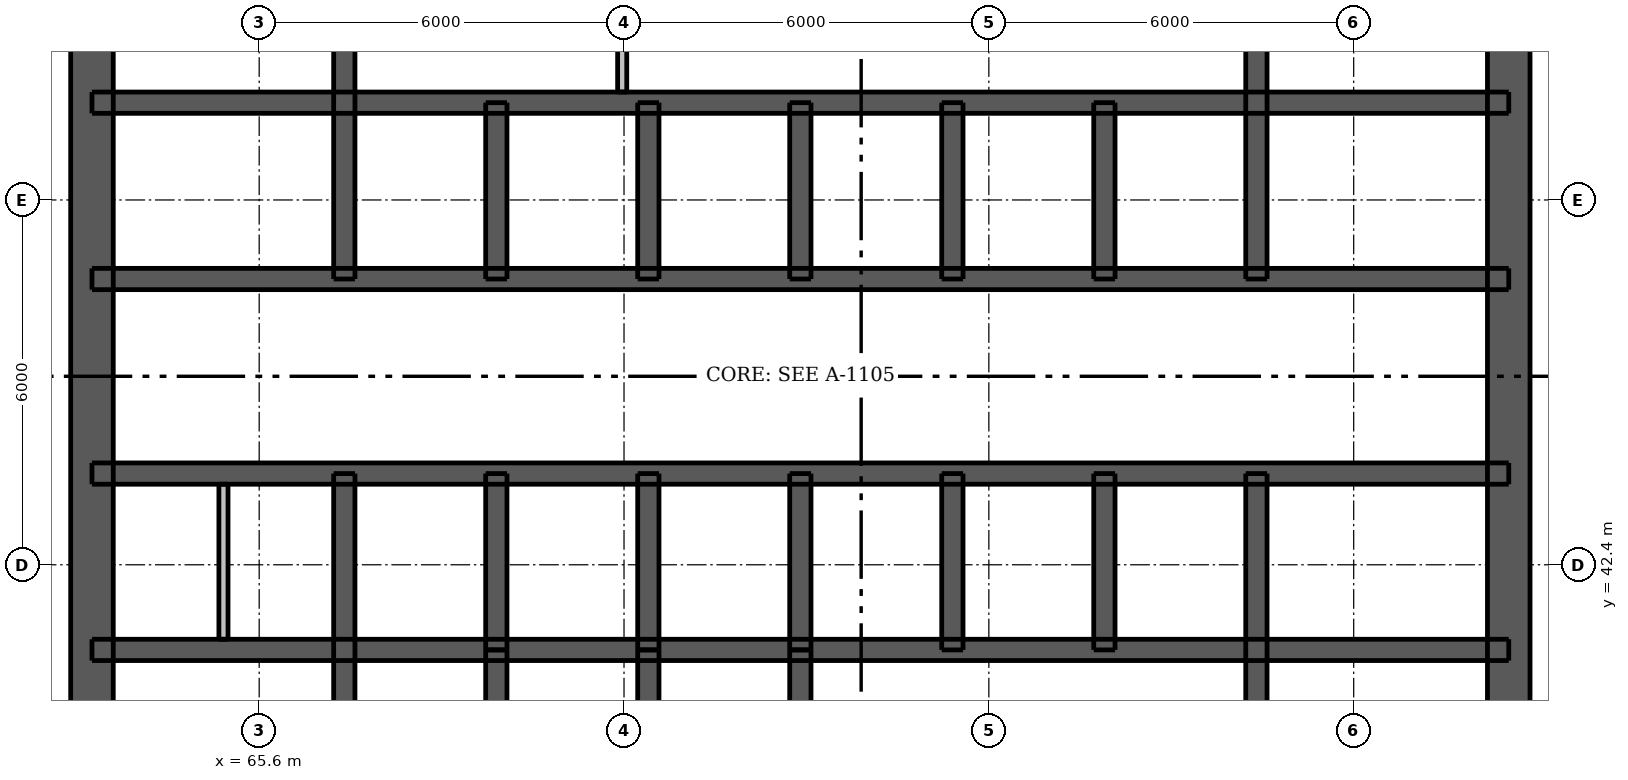
"""IFC4 building model, lengths in metres.
Left out: names, types, materials, properties, quantities, classifications, styles, units other than length and angle.
Written with IfcOpenShell. Run it as: python <this file> out.ifc"""

import sys

from ifc_helpers import new_model, si_unit, direction, frame, frame_2d, origin, place, context, subcontext, project, spatial, rectangle, extrude, element, fill, save


model = new_model("IFC4")
c1 = context("Model", 3, precision=1e-05, world=origin(), true_north=direction((0.0, 1.0)))
c2 = subcontext(c1, "Body", "Model", "MODEL_VIEW")
j1 = project(units=[si_unit("LENGTHUNIT", "METRE"), si_unit("PLANEANGLEUNIT", "RADIAN")], contexts=[c1])
p1 = place(None, origin())
s1 = spatial("IfcSite", under=j1, at=p1, CompositionType="ELEMENT")
p2 = place(p1, origin())
s2 = spatial("IfcBuilding", under=s1, at=p2, CompositionType="ELEMENT")
p3 = place(p2, frame((0.0, 0.0, 164.8)))
s3 = spatial("IfcBuildingStorey", under=s2, at=p3, CompositionType="ELEMENT", Elevation=164.8)
p4 = place(p3, frame((62.85, 33.5, 0.0), z_axis=(0.0, 0.0, 1.0), x_axis=(0.0, 1.0, 0.0)))
e1 = element("IfcWall", 1, at=p4, inside=s3, PredefinedType="SHEAR", context=c2, shape_type="SweptSolid", body=[
    extrude(rectangle(XDim=24.0, YDim=0.7, at=frame_2d((12.0, 0.0))), origin(), (0.0, 0.0, 1.0), 3.05),
])
p5 = place(p4, frame((11.2, 0.0, 0.0)))
e2 = element("IfcOpeningElement", 2, at=p5, cuts=e1, PredefinedType="OPENING", context=c2, shape_type="SweptSolid", body=[
    extrude(rectangle(XDim=1.6, YDim=2.1, at=frame_2d((0.8, 1.05))), frame((0.0, 0.36, 0.0), z_axis=(0.0, -1.0, 0.0), x_axis=(1.0, 0.0, 0.0)), (0.0, 0.0, 1.0), 0.72),
])
p6 = place(p3, frame((86.15, 33.5, 0.0), z_axis=(0.0, 0.0, 1.0), x_axis=(0.0, 1.0, 0.0)))
e3 = element("IfcWall", 3, at=p6, inside=s3, PredefinedType="SHEAR", context=c2, shape_type="SweptSolid", body=[
    extrude(rectangle(XDim=24.0, YDim=0.7, at=frame_2d((12.0, 0.0))), origin(), (0.0, 0.0, 1.0), 3.05),
])
p7 = place(p6, frame((11.2, 0.0, 0.0)))
e4 = element("IfcOpeningElement", 4, at=p7, cuts=e3, PredefinedType="OPENING", context=c2, shape_type="SweptSolid", body=[
    extrude(rectangle(XDim=1.6, YDim=2.1, at=frame_2d((0.8, 1.05))), frame((0.0, 0.36, 0.0), z_axis=(0.0, -1.0, 0.0), x_axis=(1.0, 0.0, 0.0)), (0.0, 0.0, 1.0), 0.72),
])
p8 = place(p3, frame((62.85, 41.0, 0.0), z_axis=(0.0, 0.0, 1.0), x_axis=(1.0, 0.0, 0.0)))
e5 = element("IfcWall", 5, at=p8, inside=s3, PredefinedType="SHEAR", context=c2, shape_type="SweptSolid", body=[
    extrude(rectangle(XDim=23.3, YDim=0.35, at=frame_2d((11.65, 0.0))), origin(), (0.0, 0.0, 1.0), 3.05),
])
p9 = place(p3, frame((62.85, 43.9, 0.0), z_axis=(0.0, 0.0, 1.0), x_axis=(1.0, 0.0, 0.0)))
e6 = element("IfcWall", 6, at=p9, inside=s3, PredefinedType="SHEAR", context=c2, shape_type="SweptSolid", body=[
    extrude(rectangle(XDim=23.3, YDim=0.35, at=frame_2d((11.65, 0.0))), origin(), (0.0, 0.0, 1.0), 3.05),
])
p10 = place(p9, frame((0.806, 0.0, 0.0)))
e7 = element("IfcOpeningElement", 7, at=p10, cuts=e6, PredefinedType="OPENING", context=c2, shape_type="SweptSolid", body=[
    extrude(rectangle(XDim=0.9, YDim=2.1, at=frame_2d((0.45, 1.05))), frame((0.0, 0.185, 0.0), z_axis=(0.0, -1.0, 0.0), x_axis=(1.0, 0.0, 0.0)), (0.0, 0.0, 1.0), 0.37),
])
p11 = place(p9, frame((2.619, 0.0, 0.0)))
e8 = element("IfcOpeningElement", 8, at=p11, cuts=e6, PredefinedType="OPENING", context=c2, shape_type="SweptSolid", body=[
    extrude(rectangle(XDim=0.9, YDim=2.1, at=frame_2d((0.45, 1.05))), frame((0.0, 0.185, 0.0), z_axis=(0.0, -1.0, 0.0), x_axis=(1.0, 0.0, 0.0)), (0.0, 0.0, 1.0), 0.37),
])
p12 = place(p9, frame((20.688, 0.0, 0.0)))
e9 = element("IfcOpeningElement", 9, at=p12, cuts=e6, PredefinedType="OPENING", context=c2, shape_type="SweptSolid", body=[
    extrude(rectangle(XDim=0.9, YDim=2.1, at=frame_2d((0.45, 1.05))), frame((0.0, 0.185, 0.0), z_axis=(0.0, -1.0, 0.0), x_axis=(1.0, 0.0, 0.0)), (0.0, 0.0, 1.0), 0.37),
])
p13 = place(p9, frame((7.45, 0.0, 0.0)))
e10 = element("IfcOpeningElement", 10, at=p13, cuts=e6, PredefinedType="OPENING", context=c2, shape_type="SweptSolid", body=[
    extrude(rectangle(XDim=0.9, YDim=2.1, at=frame_2d((0.45, 1.05))), frame((0.0, 0.185, 0.0), z_axis=(0.0, -1.0, 0.0), x_axis=(1.0, 0.0, 0.0)), (0.0, 0.0, 1.0), 0.37),
])
p14 = place(p9, frame((9.95, 0.0, 0.0)))
e11 = element("IfcOpeningElement", 11, at=p14, cuts=e6, PredefinedType="OPENING", context=c2, shape_type="SweptSolid", body=[
    extrude(rectangle(XDim=0.9, YDim=2.1, at=frame_2d((0.45, 1.05))), frame((0.0, 0.185, 0.0), z_axis=(0.0, -1.0, 0.0), x_axis=(1.0, 0.0, 0.0)), (0.0, 0.0, 1.0), 0.37),
])
p15 = place(p9, frame((14.95, 0.0, 0.0)))
e12 = element("IfcOpeningElement", 12, at=p15, cuts=e6, PredefinedType="OPENING", context=c2, shape_type="SweptSolid", body=[
    extrude(rectangle(XDim=0.9, YDim=2.1, at=frame_2d((0.45, 1.05))), frame((0.0, 0.185, 0.0), z_axis=(0.0, -1.0, 0.0), x_axis=(1.0, 0.0, 0.0)), (0.0, 0.0, 1.0), 0.37),
])
p16 = place(p9, frame((17.45, 0.0, 0.0)))
e13 = element("IfcOpeningElement", 13, at=p16, cuts=e6, PredefinedType="OPENING", context=c2, shape_type="SweptSolid", body=[
    extrude(rectangle(XDim=0.9, YDim=2.1, at=frame_2d((0.45, 1.05))), frame((0.0, 0.185, 0.0), z_axis=(0.0, -1.0, 0.0), x_axis=(1.0, 0.0, 0.0)), (0.0, 0.0, 1.0), 0.37),
])
p17 = place(p3, frame((62.85, 47.1, 0.0), z_axis=(0.0, 0.0, 1.0), x_axis=(1.0, 0.0, 0.0)))
e14 = element("IfcWall", 14, at=p17, inside=s3, PredefinedType="SHEAR", context=c2, shape_type="SweptSolid", body=[
    extrude(rectangle(XDim=23.3, YDim=0.35, at=frame_2d((11.65, 0.0))), origin(), (0.0, 0.0, 1.0), 3.05),
])
p18 = place(p17, frame((1.712, 0.0, 0.0)))
e15 = element("IfcOpeningElement", 15, at=p18, cuts=e14, PredefinedType="OPENING", context=c2, shape_type="SweptSolid", body=[
    extrude(rectangle(XDim=0.9, YDim=2.1, at=frame_2d((0.45, 1.05))), frame((0.0, 0.185, 0.0), z_axis=(0.0, -1.0, 0.0), x_axis=(1.0, 0.0, 0.0)), (0.0, 0.0, 1.0), 0.37),
])
p19 = place(p17, frame((20.688, 0.0, 0.0)))
e16 = element("IfcOpeningElement", 16, at=p19, cuts=e14, PredefinedType="OPENING", context=c2, shape_type="SweptSolid", body=[
    extrude(rectangle(XDim=0.9, YDim=2.1, at=frame_2d((0.45, 1.05))), frame((0.0, 0.185, 0.0), z_axis=(0.0, -1.0, 0.0), x_axis=(1.0, 0.0, 0.0)), (0.0, 0.0, 1.0), 0.37),
])
p20 = place(p17, frame((4.85, 0.0, 0.0)))
e17 = element("IfcOpeningElement", 17, at=p20, cuts=e14, PredefinedType="OPENING", context=c2, shape_type="SweptSolid", body=[
    extrude(rectangle(XDim=1.1, YDim=2.1, at=frame_2d((0.55, 1.05))), frame((0.0, 0.185, 0.0), z_axis=(0.0, -1.0, 0.0), x_axis=(1.0, 0.0, 0.0)), (0.0, 0.0, 1.0), 0.37),
])
p21 = place(p17, frame((7.35, 0.0, 0.0)))
e18 = element("IfcOpeningElement", 18, at=p21, cuts=e14, PredefinedType="OPENING", context=c2, shape_type="SweptSolid", body=[
    extrude(rectangle(XDim=1.1, YDim=2.1, at=frame_2d((0.55, 1.05))), frame((0.0, 0.185, 0.0), z_axis=(0.0, -1.0, 0.0), x_axis=(1.0, 0.0, 0.0)), (0.0, 0.0, 1.0), 0.37),
])
p22 = place(p17, frame((9.85, 0.0, 0.0)))
e19 = element("IfcOpeningElement", 19, at=p22, cuts=e14, PredefinedType="OPENING", context=c2, shape_type="SweptSolid", body=[
    extrude(rectangle(XDim=1.1, YDim=2.1, at=frame_2d((0.55, 1.05))), frame((0.0, 0.185, 0.0), z_axis=(0.0, -1.0, 0.0), x_axis=(1.0, 0.0, 0.0)), (0.0, 0.0, 1.0), 0.37),
])
p23 = place(p17, frame((12.35, 0.0, 0.0)))
e20 = element("IfcOpeningElement", 20, at=p23, cuts=e14, PredefinedType="OPENING", context=c2, shape_type="SweptSolid", body=[
    extrude(rectangle(XDim=1.1, YDim=2.1, at=frame_2d((0.55, 1.05))), frame((0.0, 0.185, 0.0), z_axis=(0.0, -1.0, 0.0), x_axis=(1.0, 0.0, 0.0)), (0.0, 0.0, 1.0), 0.37),
])
p24 = place(p17, frame((14.85, 0.0, 0.0)))
e21 = element("IfcOpeningElement", 21, at=p24, cuts=e14, PredefinedType="OPENING", context=c2, shape_type="SweptSolid", body=[
    extrude(rectangle(XDim=1.1, YDim=2.1, at=frame_2d((0.55, 1.05))), frame((0.0, 0.185, 0.0), z_axis=(0.0, -1.0, 0.0), x_axis=(1.0, 0.0, 0.0)), (0.0, 0.0, 1.0), 0.37),
])
p25 = place(p17, frame((17.35, 0.0, 0.0)))
e22 = element("IfcOpeningElement", 22, at=p25, cuts=e14, PredefinedType="OPENING", context=c2, shape_type="SweptSolid", body=[
    extrude(rectangle(XDim=1.1, YDim=2.1, at=frame_2d((0.55, 1.05))), frame((0.0, 0.185, 0.0), z_axis=(0.0, -1.0, 0.0), x_axis=(1.0, 0.0, 0.0)), (0.0, 0.0, 1.0), 0.37),
])
p26 = place(p3, frame((62.85, 50.0, 0.0), z_axis=(0.0, 0.0, 1.0), x_axis=(1.0, 0.0, 0.0)))
e23 = element("IfcWall", 23, at=p26, inside=s3, PredefinedType="SHEAR", context=c2, shape_type="SweptSolid", body=[
    extrude(rectangle(XDim=23.3, YDim=0.35, at=frame_2d((11.65, 0.0))), origin(), (0.0, 0.0, 1.0), 3.05),
])
p27 = place(p3, frame((67.0, 33.85, 0.0), z_axis=(0.0, 0.0, 1.0), x_axis=(0.0, 1.0, 0.0)))
e24 = element("IfcWall", 24, at=p27, inside=s3, PredefinedType="SHEAR", context=c2, shape_type="SweptSolid", body=[
    extrude(rectangle(XDim=10.05, YDim=0.35, at=frame_2d((5.025, 0.0))), origin(), (0.0, 0.0, 1.0), 3.05),
])
p28 = place(p27, frame((0.55, 0.0, 0.0)))
e25 = element("IfcOpeningElement", 25, at=p28, cuts=e24, PredefinedType="OPENING", context=c2, shape_type="SweptSolid", body=[
    extrude(rectangle(XDim=1.1, YDim=2.1, at=frame_2d((0.55, 1.05))), frame((0.0, 0.185, 0.0), z_axis=(0.0, -1.0, 0.0), x_axis=(1.0, 0.0, 0.0)), (0.0, 0.0, 1.0), 0.37),
])
for number, where, z_axis, x_axis in (
    (26, (67.0, 47.1, 0.0), (0.0, 0.0, 1.0), (0.0, 1.0, 0.0)),
    (27, (82.0, 33.85, 0.0), (0.0, 0.0, 1.0), (0.0, 1.0, 0.0)),
    (28, (82.0, 47.1, 0.0), (0.0, 0.0, 1.0), (0.0, 1.0, 0.0)),
):
    element("IfcWall", number, at=place(p3, frame(where, z_axis=z_axis, x_axis=x_axis)), inside=s3, PredefinedType="SHEAR", context=c2, shape_type="SweptSolid", body=[
        extrude(rectangle(XDim=10.05, YDim=0.35, at=frame_2d((5.025, 0.0))), origin(), (0.0, 0.0, 1.0), 3.05),
    ])
for number, where, z_axis, x_axis in (
    (29, (69.5, 41.0, 0.0), (0.0, 0.0, 1.0), (0.0, 1.0, 0.0)),
    (30, (69.5, 47.1, 0.0), (0.0, 0.0, 1.0), (0.0, 1.0, 0.0)),
    (31, (72.0, 41.0, 0.0), (0.0, 0.0, 1.0), (0.0, 1.0, 0.0)),
    (32, (72.0, 47.1, 0.0), (0.0, 0.0, 1.0), (0.0, 1.0, 0.0)),
    (33, (74.5, 41.0, 0.0), (0.0, 0.0, 1.0), (0.0, 1.0, 0.0)),
    (34, (74.5, 47.1, 0.0), (0.0, 0.0, 1.0), (0.0, 1.0, 0.0)),
    (35, (77.0, 41.0, 0.0), (0.0, 0.0, 1.0), (0.0, 1.0, 0.0)),
    (36, (77.0, 47.1, 0.0), (0.0, 0.0, 1.0), (0.0, 1.0, 0.0)),
    (37, (79.5, 41.0, 0.0), (0.0, 0.0, 1.0), (0.0, 1.0, 0.0)),
    (38, (79.5, 47.1, 0.0), (0.0, 0.0, 1.0), (0.0, 1.0, 0.0)),
    (39, (69.5, 38.1, 0.0), (0.0, 0.0, 1.0), (0.0, 1.0, 0.0)),
    (40, (72.0, 38.1, 0.0), (0.0, 0.0, 1.0), (0.0, 1.0, 0.0)),
    (41, (74.5, 38.1, 0.0), (0.0, 0.0, 1.0), (0.0, 1.0, 0.0)),
):
    element("IfcWall", number, at=place(p3, frame(where, z_axis=z_axis, x_axis=x_axis)), inside=s3, PredefinedType="SHEAR", context=c2, shape_type="SweptSolid", body=[
        extrude(rectangle(XDim=2.9, YDim=0.35, at=frame_2d((1.45, 0.0))), origin(), (0.0, 0.0, 1.0), 3.05),
    ])
p29 = place(p3, frame((65.012, 41.175, 0.0), z_axis=(0.0, 0.0, 1.0), x_axis=(0.0, 1.0, 0.0)))
e42 = element("IfcWall", 42, at=p29, inside=s3, PredefinedType="PLUMBINGWALL", context=c2, shape_type="SweptSolid", body=[
    extrude(rectangle(XDim=2.55, YDim=0.15, at=frame_2d((1.275, 0.0))), origin(), (0.0, 0.0, 1.0), 3.05),
])
p30 = place(p3, frame((71.57, 50.175, 0.0), z_axis=(0.0, 0.0, 1.0), x_axis=(0.0, 1.0, 0.0)))
e43 = element("IfcWall", 43, at=p30, inside=s3, PredefinedType="PLUMBINGWALL", context=c2, shape_type="SweptSolid", body=[
    extrude(rectangle(XDim=6.625, YDim=0.15, at=frame_2d((3.312, 0.0))), origin(), (0.0, 0.0, 1.0), 3.05),
])
p31 = place(p5, origin())
e44 = element("IfcDoor", 44, at=p31, inside=s3, OperationType="DOUBLE_DOOR_SINGLE_SWING", PredefinedType="DOOR", context=c2, shape_type="SweptSolid", body=[
    extrude(rectangle(XDim=1.6, YDim=2.1, at=frame_2d((0.8, 1.05))), frame((0.0, -0.288, 0.0), z_axis=(0.0, -1.0, 0.0), x_axis=(1.0, 0.0, 0.0)), (0.0, 0.0, 1.0), 0.05),
])
fill(e2, e44)
p32 = place(p7, origin())
e45 = element("IfcDoor", 45, at=p32, inside=s3, OperationType="DOUBLE_DOOR_SINGLE_SWING", PredefinedType="DOOR", context=c2, shape_type="SweptSolid", body=[
    extrude(rectangle(XDim=1.6, YDim=2.1, at=frame_2d((0.8, 1.05))), frame((0.0, 0.337, 0.0), z_axis=(0.0, -1.0, 0.0), x_axis=(1.0, 0.0, 0.0)), (0.0, 0.0, 1.0), 0.05),
])
fill(e4, e45)
p33 = place(p10, origin())
e46 = element("IfcDoor", 46, at=p33, inside=s3, OperationType="SINGLE_SWING_LEFT", PredefinedType="DOOR", context=c2, shape_type="SweptSolid", body=[
    extrude(rectangle(XDim=0.9, YDim=2.1, at=frame_2d((0.45, 1.05))), frame((0.0, -0.112, 0.0), z_axis=(0.0, -1.0, 0.0), x_axis=(1.0, 0.0, 0.0)), (0.0, 0.0, 1.0), 0.05),
])
fill(e7, e46)
p34 = place(p11, origin())
e47 = element("IfcDoor", 47, at=p34, inside=s3, OperationType="SINGLE_SWING_RIGHT", PredefinedType="DOOR", context=c2, shape_type="SweptSolid", body=[
    extrude(rectangle(XDim=0.9, YDim=2.1, at=frame_2d((0.45, 1.05))), frame((0.0, -0.112, 0.0), z_axis=(0.0, -1.0, 0.0), x_axis=(1.0, 0.0, 0.0)), (0.0, 0.0, 1.0), 0.05),
])
fill(e8, e47)
p35 = place(p12, origin())
e48 = element("IfcDoor", 48, at=p35, inside=s3, OperationType="SINGLE_SWING_LEFT", PredefinedType="DOOR", context=c2, shape_type="SweptSolid", body=[
    extrude(rectangle(XDim=0.9, YDim=2.1, at=frame_2d((0.45, 1.05))), frame((0.0, -0.112, 0.0), z_axis=(0.0, -1.0, 0.0), x_axis=(1.0, 0.0, 0.0)), (0.0, 0.0, 1.0), 0.05),
])
fill(e9, e48)
p36 = place(p18, origin())
e49 = element("IfcDoor", 49, at=p36, inside=s3, OperationType="SINGLE_SWING_LEFT", PredefinedType="DOOR", context=c2, shape_type="SweptSolid", body=[
    extrude(rectangle(XDim=0.9, YDim=2.1, at=frame_2d((0.45, 1.05))), frame((0.0, 0.163, 0.0), z_axis=(0.0, -1.0, 0.0), x_axis=(1.0, 0.0, 0.0)), (0.0, 0.0, 1.0), 0.05),
])
fill(e15, e49)
p37 = place(p19, origin())
e50 = element("IfcDoor", 50, at=p37, inside=s3, OperationType="SINGLE_SWING_LEFT", PredefinedType="DOOR", context=c2, shape_type="SweptSolid", body=[
    extrude(rectangle(XDim=0.9, YDim=2.1, at=frame_2d((0.45, 1.05))), frame((0.0, 0.163, 0.0), z_axis=(0.0, -1.0, 0.0), x_axis=(1.0, 0.0, 0.0)), (0.0, 0.0, 1.0), 0.05),
])
fill(e16, e50)
p38 = place(p13, origin())
e51 = element("IfcDoor", 51, at=p38, inside=s3, OperationType="SINGLE_SWING_LEFT", PredefinedType="DOOR", context=c2, shape_type="SweptSolid", body=[
    extrude(rectangle(XDim=0.9, YDim=2.1, at=frame_2d((0.45, 1.05))), frame((0.0, -0.112, 0.0), z_axis=(0.0, -1.0, 0.0), x_axis=(1.0, 0.0, 0.0)), (0.0, 0.0, 1.0), 0.05),
])
fill(e10, e51)
p39 = place(p14, origin())
e52 = element("IfcDoor", 52, at=p39, inside=s3, OperationType="SINGLE_SWING_RIGHT", PredefinedType="DOOR", context=c2, shape_type="SweptSolid", body=[
    extrude(rectangle(XDim=0.9, YDim=2.1, at=frame_2d((0.45, 1.05))), frame((0.0, -0.112, 0.0), z_axis=(0.0, -1.0, 0.0), x_axis=(1.0, 0.0, 0.0)), (0.0, 0.0, 1.0), 0.05),
])
fill(e11, e52)
p40 = place(p15, origin())
e53 = element("IfcDoor", 53, at=p40, inside=s3, OperationType="SINGLE_SWING_RIGHT", PredefinedType="DOOR", context=c2, shape_type="SweptSolid", body=[
    extrude(rectangle(XDim=0.9, YDim=2.1, at=frame_2d((0.45, 1.05))), frame((0.0, -0.112, 0.0), z_axis=(0.0, -1.0, 0.0), x_axis=(1.0, 0.0, 0.0)), (0.0, 0.0, 1.0), 0.05),
])
fill(e12, e53)
p41 = place(p16, origin())
e54 = element("IfcDoor", 54, at=p41, inside=s3, OperationType="SINGLE_SWING_LEFT", PredefinedType="DOOR", context=c2, shape_type="SweptSolid", body=[
    extrude(rectangle(XDim=0.9, YDim=2.1, at=frame_2d((0.45, 1.05))), frame((0.0, -0.112, 0.0), z_axis=(0.0, -1.0, 0.0), x_axis=(1.0, 0.0, 0.0)), (0.0, 0.0, 1.0), 0.05),
])
fill(e13, e54)
p42 = place(p20, origin())
e55 = element("IfcDoor", 55, at=p42, inside=s3, OperationType="DOUBLE_DOOR_SLIDING", PredefinedType="DOOR", context=c2, shape_type="SweptSolid", body=[
    extrude(rectangle(XDim=1.1, YDim=2.1, at=frame_2d((0.55, 1.05))), frame((0.0, 0.025, 0.0), z_axis=(0.0, -1.0, 0.0), x_axis=(1.0, 0.0, 0.0)), (0.0, 0.0, 1.0), 0.05),
])
fill(e17, e55)
p43 = place(p21, origin())
e56 = element("IfcDoor", 56, at=p43, inside=s3, OperationType="DOUBLE_DOOR_SLIDING", PredefinedType="DOOR", context=c2, shape_type="SweptSolid", body=[
    extrude(rectangle(XDim=1.1, YDim=2.1, at=frame_2d((0.55, 1.05))), frame((0.0, 0.025, 0.0), z_axis=(0.0, -1.0, 0.0), x_axis=(1.0, 0.0, 0.0)), (0.0, 0.0, 1.0), 0.05),
])
fill(e18, e56)
p44 = place(p22, origin())
e57 = element("IfcDoor", 57, at=p44, inside=s3, OperationType="DOUBLE_DOOR_SLIDING", PredefinedType="DOOR", context=c2, shape_type="SweptSolid", body=[
    extrude(rectangle(XDim=1.1, YDim=2.1, at=frame_2d((0.55, 1.05))), frame((0.0, 0.025, 0.0), z_axis=(0.0, -1.0, 0.0), x_axis=(1.0, 0.0, 0.0)), (0.0, 0.0, 1.0), 0.05),
])
fill(e19, e57)
p45 = place(p23, origin())
e58 = element("IfcDoor", 58, at=p45, inside=s3, OperationType="DOUBLE_DOOR_SLIDING", PredefinedType="DOOR", context=c2, shape_type="SweptSolid", body=[
    extrude(rectangle(XDim=1.1, YDim=2.1, at=frame_2d((0.55, 1.05))), frame((0.0, 0.025, 0.0), z_axis=(0.0, -1.0, 0.0), x_axis=(1.0, 0.0, 0.0)), (0.0, 0.0, 1.0), 0.05),
])
fill(e20, e58)
p46 = place(p24, origin())
e59 = element("IfcDoor", 59, at=p46, inside=s3, OperationType="DOUBLE_DOOR_SLIDING", PredefinedType="DOOR", context=c2, shape_type="SweptSolid", body=[
    extrude(rectangle(XDim=1.1, YDim=2.1, at=frame_2d((0.55, 1.05))), frame((0.0, 0.025, 0.0), z_axis=(0.0, -1.0, 0.0), x_axis=(1.0, 0.0, 0.0)), (0.0, 0.0, 1.0), 0.05),
])
fill(e21, e59)
p47 = place(p25, origin())
e60 = element("IfcDoor", 60, at=p47, inside=s3, OperationType="DOUBLE_DOOR_SLIDING", PredefinedType="DOOR", context=c2, shape_type="SweptSolid", body=[
    extrude(rectangle(XDim=1.1, YDim=2.1, at=frame_2d((0.55, 1.05))), frame((0.0, 0.025, 0.0), z_axis=(0.0, -1.0, 0.0), x_axis=(1.0, 0.0, 0.0)), (0.0, 0.0, 1.0), 0.05),
])
fill(e22, e60)
save(model, sys.argv[1])
